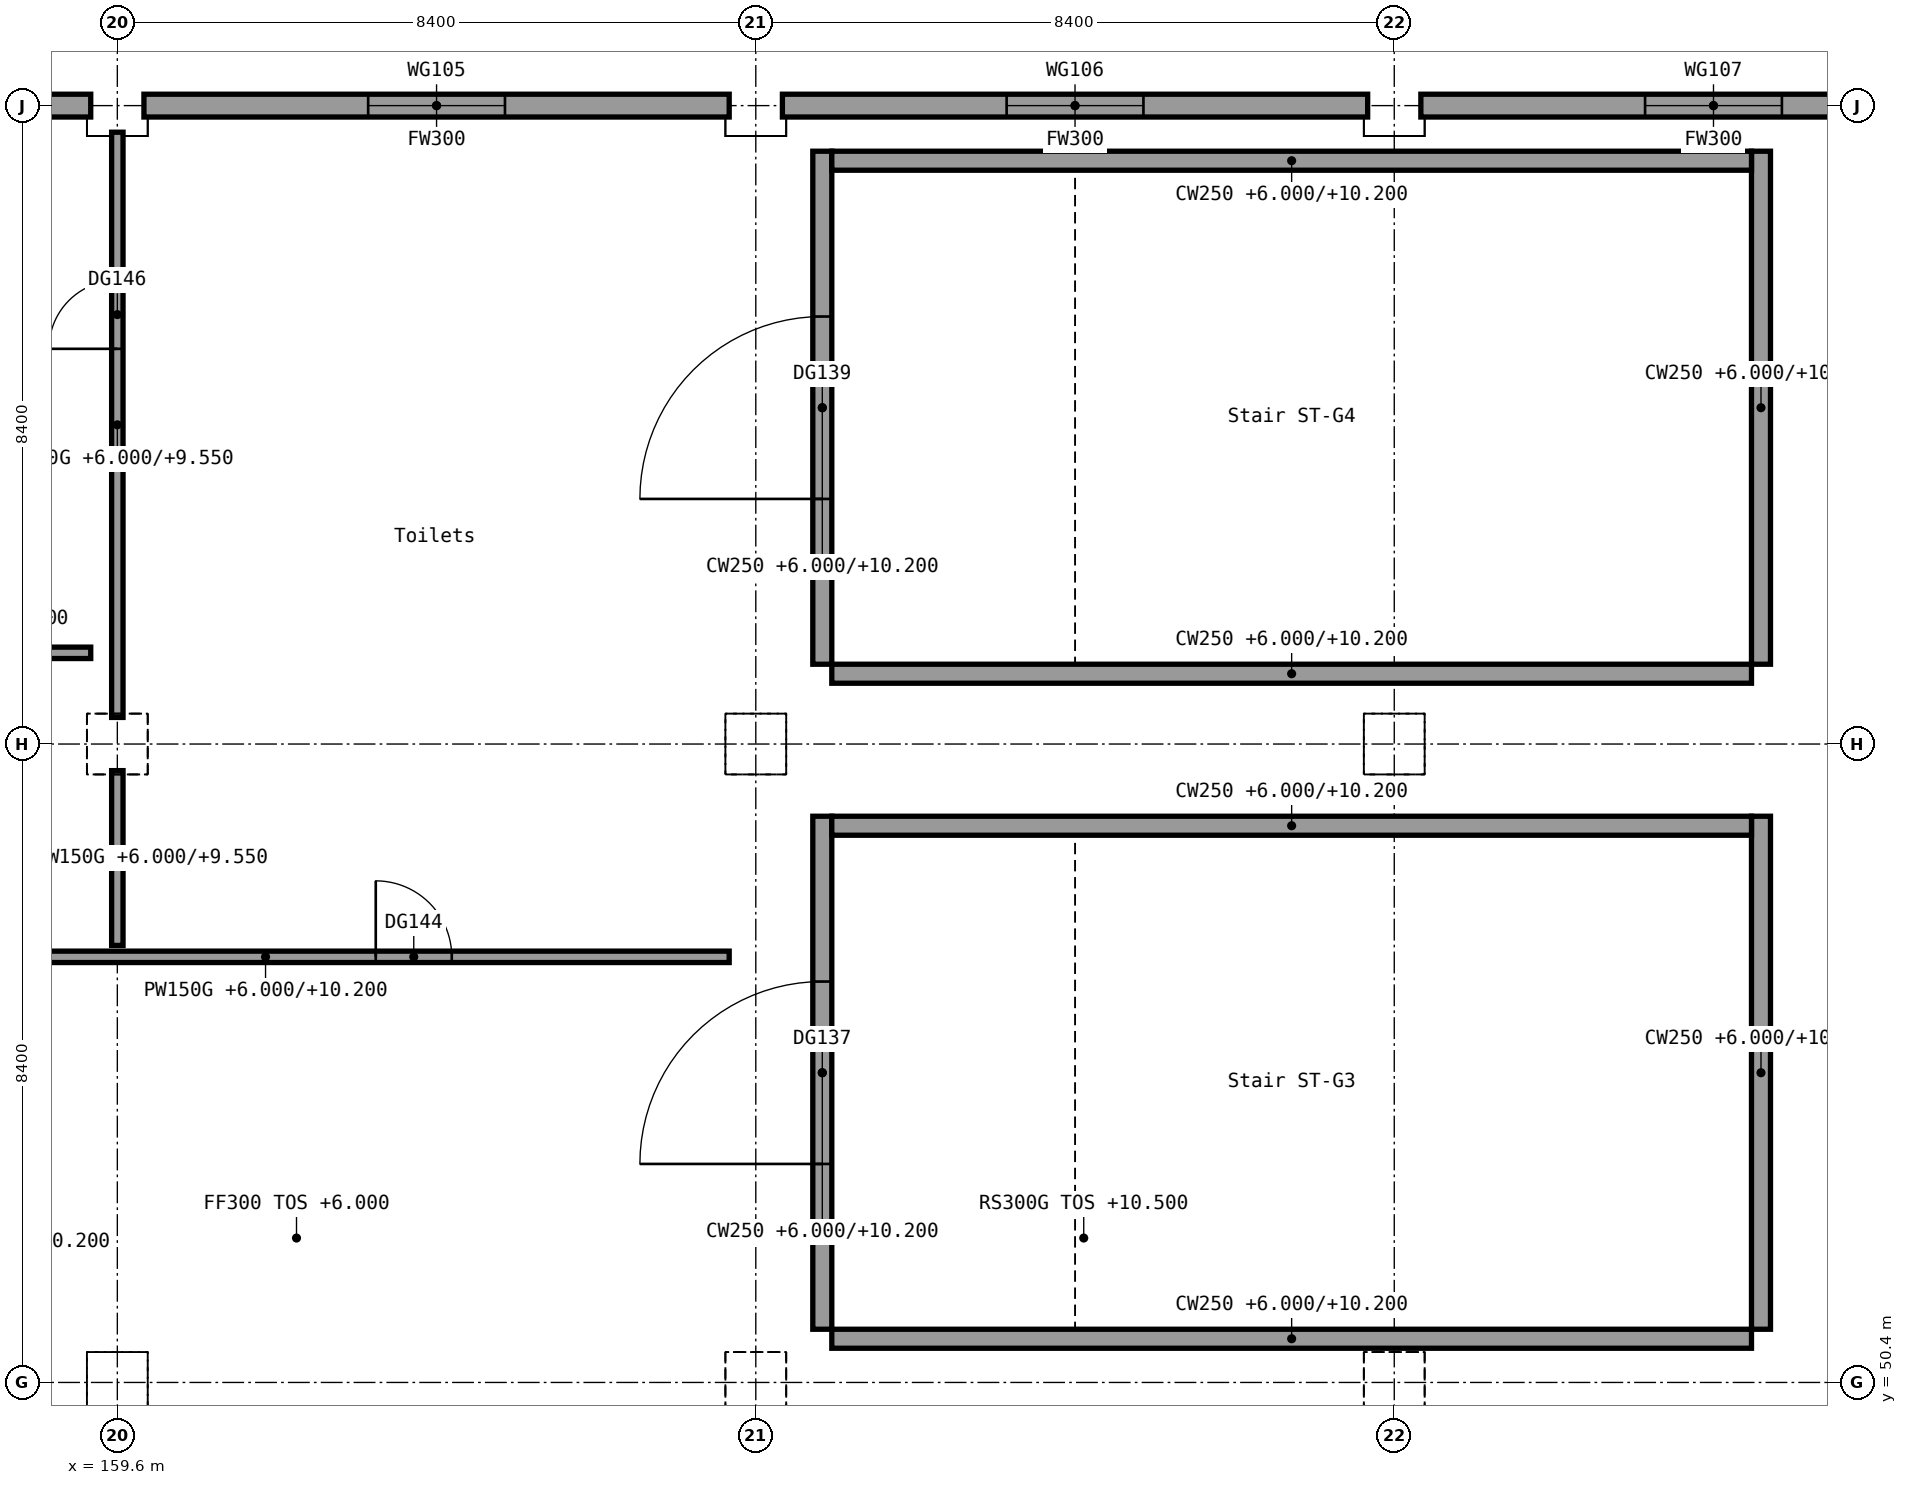
"""IFC4 building model, lengths in metres.
Left out: names, types, materials, properties, quantities, classifications, styles, units other than length and angle.
Written with IfcOpenShell. Run it as: python <this file> out.ifc"""

import sys

from ifc_helpers import new_model, si_unit, direction, frame, frame_2d, origin, origin_2d, place, context, subcontext, project, spatial, rectangle, extrude, element, fill, save


model = new_model("IFC4")
c1 = context("Model", 3, precision=1e-05, world=origin(), true_north=direction((0.0, 1.0)))
c2 = subcontext(c1, "Body", "Model", "MODEL_VIEW")
j1 = project(units=[si_unit("LENGTHUNIT", "METRE"), si_unit("PLANEANGLEUNIT", "RADIAN")], contexts=[c1])
p1 = place(None, origin())
s1 = spatial("IfcSite", under=j1, at=p1, CompositionType="ELEMENT")
p2 = place(p1, origin())
s2 = spatial("IfcBuilding", under=s1, at=p2, CompositionType="ELEMENT")
p3 = place(p2, frame((0.0, 0.0, 6.0)))
s3 = spatial("IfcBuildingStorey", under=s2, at=p3, CompositionType="ELEMENT", Elevation=6.0)
p4 = place(p3, frame((193.886, 58.008, 0.0), z_axis=(0.0, 0.0, 1.0), x_axis=(-0.642781866374, -0.766049262293, 0.0)))
e1 = element("IfcWall", 1, at=p4, inside=s3, PredefinedType="SHEAR", context=c2, shape_type="SweptSolid", body=[
    extrude(rectangle(XDim=38.95, YDim=0.4, at=frame_2d((19.475, 0.0))), origin(), (0.0, 0.0, 1.0), 4.5),
])
p5 = place(p4, frame((18.1, 0.0, 0.0)))
e2 = element("IfcOpeningElement", 2, at=p5, cuts=e1, PredefinedType="OPENING", context=c2, shape_type="SweptSolid", body=[
    extrude(rectangle(XDim=1.8, YDim=2.4, at=frame_2d((0.9, 1.2))), frame((0.0, 0.2, 0.0), z_axis=(0.0, -1.0, 0.0), x_axis=(1.0, 0.0, 0.0)), (0.0, 0.0, 1.0), 0.4),
])
p6 = place(p4, frame((34.9, 0.0, 0.0)))
e3 = element("IfcOpeningElement", 3, at=p6, cuts=e1, PredefinedType="OPENING", context=c2, shape_type="SweptSolid", body=[
    extrude(rectangle(XDim=1.8, YDim=2.4, at=frame_2d((0.9, 1.2))), frame((0.0, 0.2, 0.0), z_axis=(0.0, -1.0, 0.0), x_axis=(1.0, 0.0, 0.0)), (0.0, 0.0, 1.0), 0.4),
])
for number, where, z_axis, x_axis in (
    (4, (159.6, 50.4, 0.0), (0.0, 0.0, 1.0), (1.0, 0.0, 0.0)),
    (5, (159.6, 58.8, 0.0), (0.0, 0.0, 1.0), (1.0, 0.0, 0.0)),
    (6, (159.6, 67.2, 0.0), (0.0, 0.0, 1.0), (1.0, 0.0, 0.0)),
    (7, (168.0, 50.4, 0.0), (0.0, 0.0, 1.0), (1.0, 0.0, 0.0)),
    (8, (168.0, 58.8, 0.0), (0.0, 0.0, 1.0), (1.0, 0.0, 0.0)),
    (9, (168.0, 67.2, 0.0), (0.0, 0.0, 1.0), (1.0, 0.0, 0.0)),
    (10, (176.4, 50.4, 0.0), (0.0, 0.0, 1.0), (1.0, 0.0, 0.0)),
    (11, (176.4, 58.8, 0.0), (0.0, 0.0, 1.0), (1.0, 0.0, 0.0)),
    (12, (176.4, 67.2, 0.0), (0.0, 0.0, 1.0), (1.0, 0.0, 0.0)),
):
    element("IfcColumn", number, at=place(p3, frame(where, z_axis=z_axis, x_axis=x_axis)), inside=s3, PredefinedType="COLUMN", context=c2, shape_type="SweptSolid", body=[
        extrude(rectangle(XDim=0.7, YDim=0.7, at=origin_2d()), origin(), (0.0, 0.0, 1.0), 4.2),
    ])
p7 = place(p3, frame((151.55, 67.2, 0.0), z_axis=(0.0, 0.0, 1.0), x_axis=(1.0, 0.0, 0.0)))
e13 = element("IfcWall", 13, at=p7, inside=s3, PredefinedType="STANDARD", context=c2, shape_type="SweptSolid", body=[
    extrude(rectangle(XDim=7.7, YDim=0.3, at=frame_2d((3.85, 0.0))), origin(), (0.0, 0.0, 1.0), 4.2),
])
p8 = place(p7, frame((2.95, 0.0, 0.9)))
e14 = element("IfcOpeningElement", 14, at=p8, cuts=e13, PredefinedType="OPENING", context=c2, shape_type="SweptSolid", body=[
    extrude(rectangle(XDim=1.8, YDim=1.5, at=frame_2d((0.9, 0.75))), frame((0.0, 0.15, 0.0), z_axis=(0.0, -1.0, 0.0), x_axis=(1.0, 0.0, 0.0)), (0.0, 0.0, 1.0), 0.3),
])
p9 = place(p3, frame((159.95, 67.2, 0.0), z_axis=(0.0, 0.0, 1.0), x_axis=(1.0, 0.0, 0.0)))
e15 = element("IfcWall", 15, at=p9, inside=s3, PredefinedType="STANDARD", context=c2, shape_type="SweptSolid", body=[
    extrude(rectangle(XDim=7.7, YDim=0.3, at=frame_2d((3.85, 0.0))), origin(), (0.0, 0.0, 1.0), 4.2),
])
p10 = place(p9, frame((2.95, 0.0, 0.9)))
e16 = element("IfcOpeningElement", 16, at=p10, cuts=e15, PredefinedType="OPENING", context=c2, shape_type="SweptSolid", body=[
    extrude(rectangle(XDim=1.8, YDim=1.5, at=frame_2d((0.9, 0.75))), frame((0.0, 0.15, 0.0), z_axis=(0.0, -1.0, 0.0), x_axis=(1.0, 0.0, 0.0)), (0.0, 0.0, 1.0), 0.3),
])
p11 = place(p3, frame((168.35, 67.2, 0.0), z_axis=(0.0, 0.0, 1.0), x_axis=(1.0, 0.0, 0.0)))
e17 = element("IfcWall", 17, at=p11, inside=s3, PredefinedType="STANDARD", context=c2, shape_type="SweptSolid", body=[
    extrude(rectangle(XDim=7.7, YDim=0.3, at=frame_2d((3.85, 0.0))), origin(), (0.0, 0.0, 1.0), 4.2),
])
p12 = place(p11, frame((2.95, 0.0, 0.9)))
e18 = element("IfcOpeningElement", 18, at=p12, cuts=e17, PredefinedType="OPENING", context=c2, shape_type="SweptSolid", body=[
    extrude(rectangle(XDim=1.8, YDim=1.5, at=frame_2d((0.9, 0.75))), frame((0.0, 0.15, 0.0), z_axis=(0.0, -1.0, 0.0), x_axis=(1.0, 0.0, 0.0)), (0.0, 0.0, 1.0), 0.3),
])
p13 = place(p3, frame((176.75, 67.2, 0.0), z_axis=(0.0, 0.0, 1.0), x_axis=(1.0, 0.0, 0.0)))
e19 = element("IfcWall", 19, at=p13, inside=s3, PredefinedType="STANDARD", context=c2, shape_type="SweptSolid", body=[
    extrude(rectangle(XDim=7.7, YDim=0.3, at=frame_2d((3.85, 0.0))), origin(), (0.0, 0.0, 1.0), 4.2),
])
p14 = place(p13, frame((2.95, 0.0, 0.9)))
e20 = element("IfcOpeningElement", 20, at=p14, cuts=e19, PredefinedType="OPENING", context=c2, shape_type="SweptSolid", body=[
    extrude(rectangle(XDim=1.8, YDim=1.5, at=frame_2d((0.9, 0.75))), frame((0.0, 0.15, 0.0), z_axis=(0.0, -1.0, 0.0), x_axis=(1.0, 0.0, 0.0)), (0.0, 0.0, 1.0), 0.3),
])
p15 = place(p3, frame((168.875, 51.1, 0.0), z_axis=(0.0, 0.0, 1.0), x_axis=(0.0, 1.0, 0.0)))
e21 = element("IfcWall", 21, at=p15, inside=s3, PredefinedType="SHEAR", context=c2, shape_type="SweptSolid", body=[
    extrude(rectangle(XDim=6.75, YDim=0.25, at=frame_2d((3.375, 0.0))), origin(), (0.0, 0.0, 1.0), 4.2),
])
p16 = place(p15, frame((2.175, 0.0, 0.0)))
e22 = element("IfcOpeningElement", 22, at=p16, cuts=e21, PredefinedType="OPENING", context=c2, shape_type="SweptSolid", body=[
    extrude(rectangle(XDim=2.4, YDim=2.1, at=frame_2d((1.2, 1.05))), frame((0.0, 0.125, 0.0), z_axis=(0.0, -1.0, 0.0), x_axis=(1.0, 0.0, 0.0)), (0.0, 0.0, 1.0), 0.25),
])
p17 = place(p3, frame((181.225, 51.1, 0.0), z_axis=(0.0, 0.0, 1.0), x_axis=(0.0, 1.0, 0.0)))
e23 = element("IfcWall", 23, at=p17, inside=s3, PredefinedType="SHEAR", context=c2, shape_type="SweptSolid", body=[
    extrude(rectangle(XDim=6.75, YDim=0.25, at=frame_2d((3.375, 0.0))), origin(), (0.0, 0.0, 1.0), 4.2),
])
for number, where, z_axis, x_axis in (
    (24, (169.0, 57.725, 0.0), (0.0, 0.0, 1.0), (1.0, 0.0, 0.0)),
    (25, (169.0, 50.975, 0.0), (0.0, 0.0, 1.0), (1.0, 0.0, 0.0)),
):
    element("IfcWall", number, at=place(p3, frame(where, z_axis=z_axis, x_axis=x_axis)), inside=s3, PredefinedType="SHEAR", context=c2, shape_type="SweptSolid", body=[
        extrude(rectangle(XDim=12.1, YDim=0.25, at=frame_2d((6.05, 0.0))), origin(), (0.0, 0.0, 1.0), 4.2),
    ])
p18 = place(p3, frame((168.875, 59.85, 0.0), z_axis=(0.0, 0.0, 1.0), x_axis=(0.0, 1.0, 0.0)))
e26 = element("IfcWall", 26, at=p18, inside=s3, PredefinedType="SHEAR", context=c2, shape_type="SweptSolid", body=[
    extrude(rectangle(XDim=6.75, YDim=0.25, at=frame_2d((3.375, 0.0))), origin(), (0.0, 0.0, 1.0), 4.2),
])
p19 = place(p18, frame((2.175, 0.0, 0.0)))
e27 = element("IfcOpeningElement", 27, at=p19, cuts=e26, PredefinedType="OPENING", context=c2, shape_type="SweptSolid", body=[
    extrude(rectangle(XDim=2.4, YDim=2.1, at=frame_2d((1.2, 1.05))), frame((0.0, 0.125, 0.0), z_axis=(0.0, -1.0, 0.0), x_axis=(1.0, 0.0, 0.0)), (0.0, 0.0, 1.0), 0.25),
])
p20 = place(p3, frame((181.225, 59.85, 0.0), z_axis=(0.0, 0.0, 1.0), x_axis=(0.0, 1.0, 0.0)))
e28 = element("IfcWall", 28, at=p20, inside=s3, PredefinedType="SHEAR", context=c2, shape_type="SweptSolid", body=[
    extrude(rectangle(XDim=6.75, YDim=0.25, at=frame_2d((3.375, 0.0))), origin(), (0.0, 0.0, 1.0), 4.2),
])
for number, where, z_axis, x_axis in (
    (29, (169.0, 66.475, 0.0), (0.0, 0.0, 1.0), (1.0, 0.0, 0.0)),
    (30, (169.0, 59.725, 0.0), (0.0, 0.0, 1.0), (1.0, 0.0, 0.0)),
):
    element("IfcWall", number, at=place(p3, frame(where, z_axis=z_axis, x_axis=x_axis)), inside=s3, PredefinedType="SHEAR", context=c2, shape_type="SweptSolid", body=[
        extrude(rectangle(XDim=12.1, YDim=0.25, at=frame_2d((6.05, 0.0))), origin(), (0.0, 0.0, 1.0), 4.2),
    ])
p21 = place(p3, frame((155.45, 56.0, 0.0), z_axis=(0.0, 0.0, 1.0), x_axis=(1.0, 0.0, 0.0)))
e31 = element("IfcWall", 31, at=p21, inside=s3, PredefinedType="PARTITIONING", context=c2, shape_type="SweptSolid", body=[
    extrude(rectangle(XDim=12.2, YDim=0.15, at=frame_2d((6.1, 0.0))), origin(), (0.0, 0.0, 1.0), 4.2),
])
p22 = place(p21, frame((7.55, 0.0, 0.0)))
e32 = element("IfcOpeningElement", 32, at=p22, cuts=e31, PredefinedType="OPENING", context=c2, shape_type="SweptSolid", body=[
    extrude(rectangle(XDim=1.0, YDim=2.1, at=frame_2d((0.5, 1.05))), frame((0.0, 0.075, 0.0), z_axis=(0.0, -1.0, 0.0), x_axis=(1.0, 0.0, 0.0)), (0.0, 0.0, 1.0), 0.15),
])
p23 = place(p21, frame((1.45, 0.0, 0.0)))
e33 = element("IfcOpeningElement", 33, at=p23, cuts=e31, PredefinedType="OPENING", context=c2, shape_type="SweptSolid", body=[
    extrude(rectangle(XDim=1.0, YDim=2.1, at=frame_2d((0.5, 1.05))), frame((0.0, 0.075, 0.0), z_axis=(0.0, -1.0, 0.0), x_axis=(1.0, 0.0, 0.0)), (0.0, 0.0, 1.0), 0.15),
])
p24 = place(p3, frame((159.6, 56.15, 0.0), z_axis=(0.0, 0.0, 1.0), x_axis=(0.0, 1.0, 0.0)))
e34 = element("IfcWall", 34, at=p24, inside=s3, PredefinedType="PARTITIONING", context=c2, shape_type="SweptSolid", body=[
    extrude(rectangle(XDim=2.3, YDim=0.15, at=frame_2d((1.15, 0.0))), origin(), (0.0, 0.0, 1.0), 3.55),
])
p25 = place(p3, frame((159.6, 59.15, 0.0), z_axis=(0.0, 0.0, 1.0), x_axis=(0.0, 1.0, 0.0)))
e35 = element("IfcWall", 35, at=p25, inside=s3, PredefinedType="PARTITIONING", context=c2, shape_type="SweptSolid", body=[
    extrude(rectangle(XDim=7.7, YDim=0.15, at=frame_2d((3.85, 0.0))), origin(), (0.0, 0.0, 1.0), 3.55),
])
p26 = place(p25, frame((4.85, 0.0, 0.0)))
e36 = element("IfcOpeningElement", 36, at=p26, cuts=e35, PredefinedType="OPENING", context=c2, shape_type="SweptSolid", body=[
    extrude(rectangle(XDim=0.9, YDim=2.1, at=frame_2d((0.45, 1.05))), frame((0.0, 0.075, 0.0), z_axis=(0.0, -1.0, 0.0), x_axis=(1.0, 0.0, 0.0)), (0.0, 0.0, 1.0), 0.15),
])
p27 = place(p3, frame((155.45, 60.0, 0.0), z_axis=(0.0, 0.0, 1.0), x_axis=(1.0, 0.0, 0.0)))
e37 = element("IfcWall", 37, at=p27, inside=s3, PredefinedType="PARTITIONING", context=c2, shape_type="SweptSolid", body=[
    extrude(rectangle(XDim=3.8, YDim=0.15, at=frame_2d((1.9, 0.0))), origin(), (0.0, 0.0, 1.0), 4.2),
])
p28 = place(p16, origin())
e38 = element("IfcDoor", 38, at=p28, inside=s3, OperationType="DOUBLE_DOOR_SINGLE_SWING", PredefinedType="DOOR", context=c2, shape_type="SweptSolid", body=[
    extrude(rectangle(XDim=2.4, YDim=2.1, at=frame_2d((1.2, 1.05))), frame((0.0, 0.025, 0.0), z_axis=(0.0, -1.0, 0.0), x_axis=(1.0, 0.0, 0.0)), (0.0, 0.0, 1.0), 0.05),
])
fill(e22, e38)
p29 = place(p19, origin())
e39 = element("IfcDoor", 39, at=p29, inside=s3, OperationType="DOUBLE_DOOR_SINGLE_SWING", PredefinedType="DOOR", context=c2, shape_type="SweptSolid", body=[
    extrude(rectangle(XDim=2.4, YDim=2.1, at=frame_2d((1.2, 1.05))), frame((0.0, 0.025, 0.0), z_axis=(0.0, -1.0, 0.0), x_axis=(1.0, 0.0, 0.0)), (0.0, 0.0, 1.0), 0.05),
])
fill(e27, e39)
p30 = place(p22, origin())
e40 = element("IfcDoor", 40, at=p30, inside=s3, OperationType="SINGLE_SWING_LEFT", PredefinedType="DOOR", context=c2, shape_type="SweptSolid", body=[
    extrude(rectangle(XDim=1.0, YDim=2.1, at=frame_2d((0.5, 1.05))), frame((0.0, 0.025, 0.0), z_axis=(0.0, -1.0, 0.0), x_axis=(1.0, 0.0, 0.0)), (0.0, 0.0, 1.0), 0.05),
])
fill(e32, e40)
p31 = place(p26, origin())
e41 = element("IfcDoor", 41, at=p31, inside=s3, OperationType="SINGLE_SWING_LEFT", PredefinedType="DOOR", context=c2, shape_type="SweptSolid", body=[
    extrude(rectangle(XDim=0.9, YDim=2.1, at=frame_2d((0.45, 1.05))), frame((0.0, 0.025, 0.0), z_axis=(0.0, -1.0, 0.0), x_axis=(1.0, 0.0, 0.0)), (0.0, 0.0, 1.0), 0.05),
])
fill(e36, e41)
p32 = place(p10, origin())
e42 = element("IfcWindow", 42, at=p32, inside=s3, PartitioningType="SINGLE_PANEL", PredefinedType="WINDOW", context=c2, shape_type="SweptSolid", body=[
    extrude(rectangle(XDim=1.8, YDim=1.5, at=frame_2d((0.9, 0.75))), frame((0.0, 0.03, 0.0), z_axis=(0.0, -1.0, 0.0), x_axis=(1.0, 0.0, 0.0)), (0.0, 0.0, 1.0), 0.06),
])
fill(e16, e42)
p33 = place(p12, origin())
e43 = element("IfcWindow", 43, at=p33, inside=s3, PartitioningType="SINGLE_PANEL", PredefinedType="WINDOW", context=c2, shape_type="SweptSolid", body=[
    extrude(rectangle(XDim=1.8, YDim=1.5, at=frame_2d((0.9, 0.75))), frame((0.0, 0.03, 0.0), z_axis=(0.0, -1.0, 0.0), x_axis=(1.0, 0.0, 0.0)), (0.0, 0.0, 1.0), 0.06),
])
fill(e18, e43)
p34 = place(p14, origin())
e44 = element("IfcWindow", 44, at=p34, inside=s3, PartitioningType="SINGLE_PANEL", PredefinedType="WINDOW", context=c2, shape_type="SweptSolid", body=[
    extrude(rectangle(XDim=1.8, YDim=1.5, at=frame_2d((0.9, 0.75))), frame((0.0, 0.03, 0.0), z_axis=(0.0, -1.0, 0.0), x_axis=(1.0, 0.0, 0.0)), (0.0, 0.0, 1.0), 0.06),
])
fill(e20, e44)
save(model, sys.argv[1])
